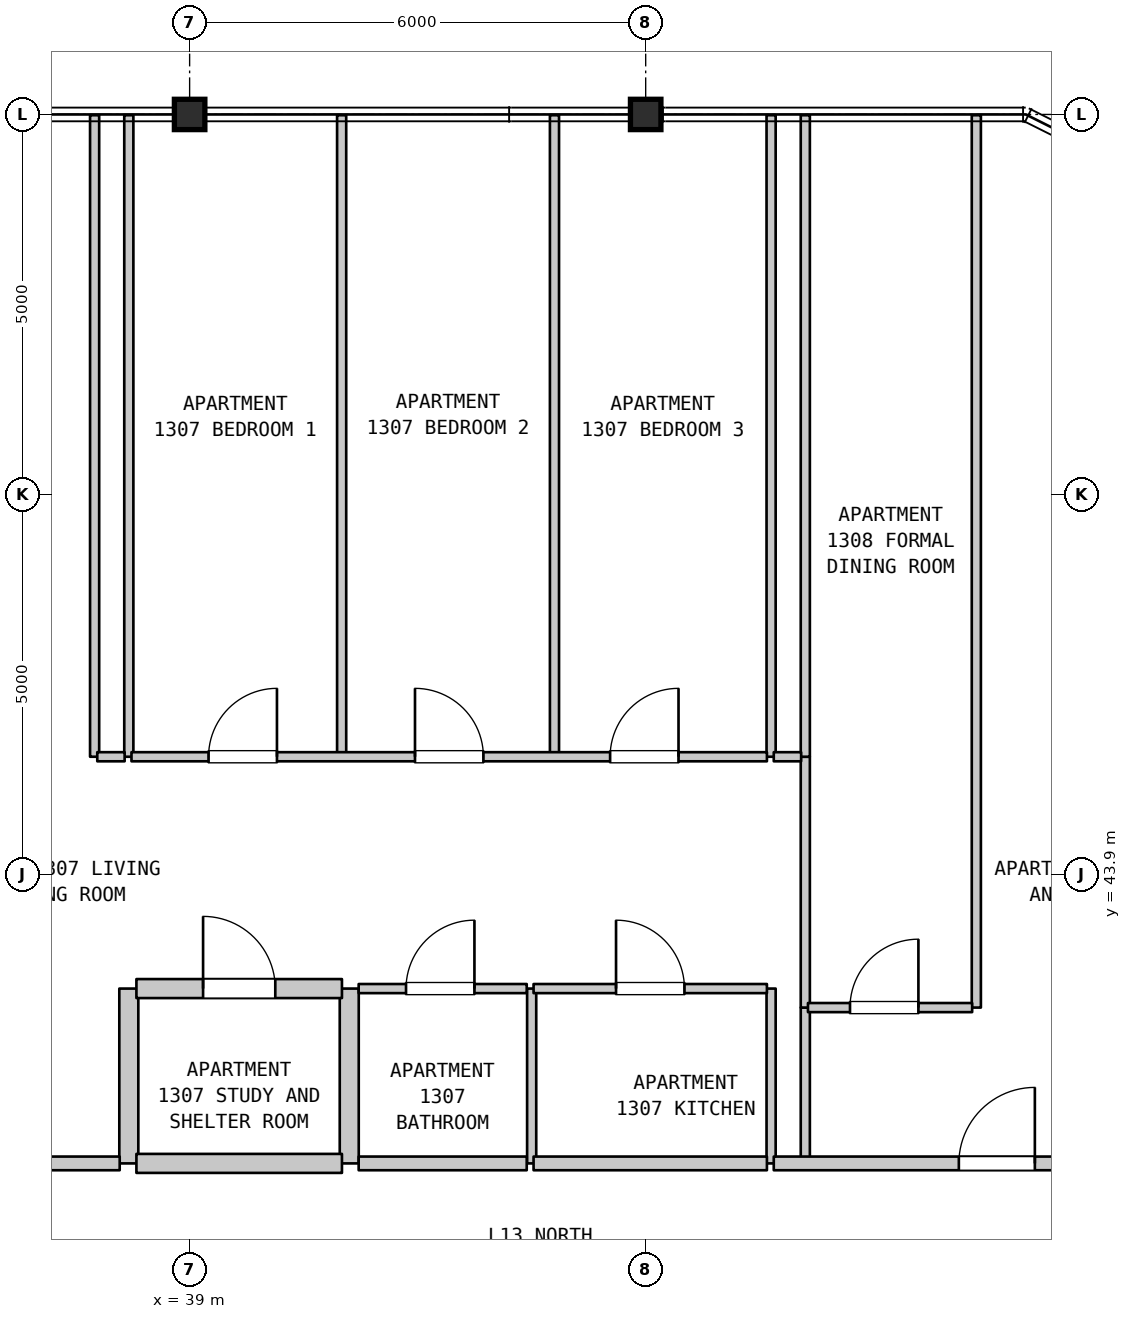
"""IFC4 building model, lengths in metres.
Left out: names, types, materials, properties, quantities, classifications, styles, units other than length and angle.
Written with IfcOpenShell. Run it as: python <this file> out.ifc"""

import sys

from ifc_helpers import new_model, si_unit, direction, frame, frame_2d, origin, origin_2d, place, context, subcontext, project, spatial, rectangle, i_section, extrude, element, fill, save


model = new_model("IFC4")
c1 = context("Model", 3, precision=1e-05, world=origin(), true_north=direction((0.0, 1.0)))
c2 = subcontext(c1, "Body", "Model", "MODEL_VIEW")
j1 = project(units=[si_unit("LENGTHUNIT", "METRE"), si_unit("PLANEANGLEUNIT", "RADIAN")], contexts=[c1])
p1 = place(None, origin())
s1 = spatial("IfcSite", under=j1, at=p1, CompositionType="ELEMENT")
p2 = place(p1, origin())
s2 = spatial("IfcBuilding", under=s1, at=p2, CompositionType="ELEMENT")
p3 = place(p2, frame((0.0, 0.0, 57.3)))
s3 = spatial("IfcBuildingStorey", under=s2, at=p3, CompositionType="ELEMENT", Elevation=57.3)
for number, where, z_axis, x_axis in (
    (1, (39.0, 53.9, 0.0), (0.0, 0.0, 1.0), (1.0, 0.0, 0.0)),
    (2, (45.0, 53.9, 0.0), (0.0, 0.0, 1.0), (1.0, 0.0, 0.0)),
):
    element("IfcColumn", number, at=place(p3, frame(where, z_axis=z_axis, x_axis=x_axis)), inside=s3, PredefinedType="COLUMN", context=c2, shape_type="SweptSolid", body=[
        extrude(i_section(OverallWidth=0.401, OverallDepth=0.399, WebThickness=0.025, FlangeThickness=0.04, FilletRadius=0.015, at=origin_2d()), origin(), (0.0, 0.0, 1.0), 3.7),
    ])
p4 = place(p3, frame((37.75, 45.45, 0.0), z_axis=(0.0, 0.0, 1.0), x_axis=(0.0, 1.0, 0.0)))
e3 = element("IfcWall", 3, at=p4, inside=s3, PredefinedType="PARTITIONING", context=c2, shape_type="SweptSolid", body=[
    extrude(rectangle(XDim=8.44, YDim=0.12, at=frame_2d((4.22, 0.0))), origin(), (0.0, 0.0, 1.0), 3.28),
])
p5 = place(p3, frame((38.2, 40.1, 0.0), z_axis=(0.0, 0.0, 1.0), x_axis=(0.0, 1.0, 0.0)))
e4 = element("IfcWall", 4, at=p5, inside=s3, PredefinedType="STANDARD", context=c2, shape_type="SweptSolid", body=[
    extrude(rectangle(XDim=2.3, YDim=0.25, at=frame_2d((1.15, 0.0))), origin(), (0.0, 0.0, 1.0), 3.28),
])
for number, where, z_axis, x_axis in (
    (5, (38.2, 45.45, 0.0), (0.0, 0.0, 1.0), (0.0, 1.0, 0.0)),
    (6, (41.0, 45.45, 0.0), (0.0, 0.0, 1.0), (0.0, 1.0, 0.0)),
):
    element("IfcWall", number, at=place(p3, frame(where, z_axis=z_axis, x_axis=x_axis)), inside=s3, PredefinedType="PARTITIONING", context=c2, shape_type="SweptSolid", body=[
        extrude(rectangle(XDim=8.44, YDim=0.12, at=frame_2d((4.22, 0.0))), origin(), (0.0, 0.0, 1.0), 3.28),
    ])
p6 = place(p3, frame((41.1, 40.1, 0.0), z_axis=(0.0, 0.0, 1.0), x_axis=(0.0, 1.0, 0.0)))
e7 = element("IfcWall", 7, at=p6, inside=s3, PredefinedType="STANDARD", context=c2, shape_type="SweptSolid", body=[
    extrude(rectangle(XDim=2.3, YDim=0.25, at=frame_2d((1.15, 0.0))), origin(), (0.0, 0.0, 1.0), 3.28),
])
p7 = place(p3, frame((43.5, 40.1, 0.0), z_axis=(0.0, 0.0, 1.0), x_axis=(0.0, 1.0, 0.0)))
e8 = element("IfcWall", 8, at=p7, inside=s3, PredefinedType="PARTITIONING", context=c2, shape_type="SweptSolid", body=[
    extrude(rectangle(XDim=2.3, YDim=0.12, at=frame_2d((1.15, 0.0))), origin(), (0.0, 0.0, 1.0), 3.28),
])
p8 = place(p3, frame((43.8, 45.45, 0.0), z_axis=(0.0, 0.0, 1.0), x_axis=(0.0, 1.0, 0.0)))
e9 = element("IfcWall", 9, at=p8, inside=s3, PredefinedType="PARTITIONING", context=c2, shape_type="SweptSolid", body=[
    extrude(rectangle(XDim=8.44, YDim=0.12, at=frame_2d((4.22, 0.0))), origin(), (0.0, 0.0, 1.0), 3.28),
])
p9 = place(p3, frame((46.65, 40.1, 0.0), z_axis=(0.0, 0.0, 1.0), x_axis=(0.0, 1.0, 0.0)))
e10 = element("IfcWall", 10, at=p9, inside=s3, PredefinedType="PARTITIONING", context=c2, shape_type="SweptSolid", body=[
    extrude(rectangle(XDim=2.3, YDim=0.12, at=frame_2d((1.15, 0.0))), origin(), (0.0, 0.0, 1.0), 3.28),
])
p10 = place(p3, frame((46.65, 45.45, 0.0), z_axis=(0.0, 0.0, 1.0), x_axis=(0.0, 1.0, 0.0)))
e11 = element("IfcWall", 11, at=p10, inside=s3, PredefinedType="PARTITIONING", context=c2, shape_type="SweptSolid", body=[
    extrude(rectangle(XDim=8.44, YDim=0.12, at=frame_2d((4.22, 0.0))), origin(), (0.0, 0.0, 1.0), 3.28),
])
p11 = place(p3, frame((47.1, 40.1, 0.0), z_axis=(0.0, 0.0, 1.0), x_axis=(0.0, 1.0, 0.0)))
e12 = element("IfcWall", 12, at=p11, inside=s3, PredefinedType="PARTITIONING", context=c2, shape_type="SweptSolid", body=[
    extrude(rectangle(XDim=2.05, YDim=0.12, at=frame_2d((1.025, 0.0))), origin(), (0.0, 0.0, 1.0), 3.28),
])
p12 = place(p3, frame((47.1, 42.15, 0.0), z_axis=(0.0, 0.0, 1.0), x_axis=(0.0, 1.0, 0.0)))
e13 = element("IfcWall", 13, at=p12, inside=s3, PredefinedType="PARTITIONING", context=c2, shape_type="SweptSolid", body=[
    extrude(rectangle(XDim=3.3, YDim=0.12, at=frame_2d((1.65, 0.0))), origin(), (0.0, 0.0, 1.0), 3.28),
])
p13 = place(p3, frame((47.1, 45.45, 0.0), z_axis=(0.0, 0.0, 1.0), x_axis=(0.0, 1.0, 0.0)))
e14 = element("IfcWall", 14, at=p13, inside=s3, PredefinedType="PARTITIONING", context=c2, shape_type="SweptSolid", body=[
    extrude(rectangle(XDim=8.44, YDim=0.12, at=frame_2d((4.22, 0.0))), origin(), (0.0, 0.0, 1.0), 3.28),
])
p14 = place(p3, frame((49.35, 42.15, 0.0), z_axis=(0.0, 0.0, 1.0), x_axis=(0.0, 1.0, 0.0)))
e15 = element("IfcWall", 15, at=p14, inside=s3, PredefinedType="PARTITIONING", context=c2, shape_type="SweptSolid", body=[
    extrude(rectangle(XDim=11.74, YDim=0.12, at=frame_2d((5.87, 0.0))), origin(), (0.0, 0.0, 1.0), 3.28),
])
p15 = place(p3, frame((32.535, 40.1, 0.0), z_axis=(0.0, 0.0, 1.0), x_axis=(1.0, 0.0, 0.0)))
e16 = element("IfcWall", 16, at=p15, inside=s3, PredefinedType="STANDARD", context=c2, shape_type="SweptSolid", body=[
    extrude(rectangle(XDim=5.545, YDim=0.18, at=frame_2d((2.772, 0.0))), origin(), (0.0, 0.0, 1.0), 3.28),
])
p16 = place(p15, frame((2.435, 0.0, 0.0)))
e17 = element("IfcOpeningElement", 17, at=p16, cuts=e16, PredefinedType="OPENING", context=c2, shape_type="SweptSolid", body=[
    extrude(rectangle(XDim=1.0, YDim=2.15, at=frame_2d((0.5, 1.075))), frame((0.0, 0.1, 0.0), z_axis=(0.0, -1.0, 0.0), x_axis=(1.0, 0.0, 0.0)), (0.0, 0.0, 1.0), 0.2),
])
p17 = place(p3, frame((38.3, 40.1, 0.0), z_axis=(0.0, 0.0, 1.0), x_axis=(1.0, 0.0, 0.0)))
e18 = element("IfcWall", 18, at=p17, inside=s3, PredefinedType="STANDARD", context=c2, shape_type="SweptSolid", body=[
    extrude(rectangle(XDim=2.704, YDim=0.25, at=frame_2d((1.352, 0.0))), origin(), (0.0, 0.0, 1.0), 3.28),
])
p18 = place(p3, frame((41.224, 40.1, 0.0), z_axis=(0.0, 0.0, 1.0), x_axis=(1.0, 0.0, 0.0)))
e19 = element("IfcWall", 19, at=p18, inside=s3, PredefinedType="STANDARD", context=c2, shape_type="SweptSolid", body=[
    extrude(rectangle(XDim=2.211, YDim=0.18, at=frame_2d((1.105, 0.0))), origin(), (0.0, 0.0, 1.0), 3.28),
])
p19 = place(p3, frame((43.525, 40.1, 0.0), z_axis=(0.0, 0.0, 1.0), x_axis=(1.0, 0.0, 0.0)))
e20 = element("IfcWall", 20, at=p19, inside=s3, PredefinedType="STANDARD", context=c2, shape_type="SweptSolid", body=[
    extrude(rectangle(XDim=3.07, YDim=0.18, at=frame_2d((1.535, 0.0))), origin(), (0.0, 0.0, 1.0), 3.28),
])
p20 = place(p3, frame((46.685, 40.1, 0.0), z_axis=(0.0, 0.0, 1.0), x_axis=(1.0, 0.0, 0.0)))
e21 = element("IfcWall", 21, at=p20, inside=s3, PredefinedType="STANDARD", context=c2, shape_type="SweptSolid", body=[
    extrude(rectangle(XDim=5.61, YDim=0.18, at=frame_2d((2.805, 0.0))), origin(), (0.0, 0.0, 1.0), 3.28),
])
p21 = place(p20, frame((2.435, 0.0, 0.0)))
e22 = element("IfcOpeningElement", 22, at=p21, cuts=e21, PredefinedType="OPENING", context=c2, shape_type="SweptSolid", body=[
    extrude(rectangle(XDim=1.0, YDim=2.15, at=frame_2d((0.5, 1.075))), frame((0.0, 0.1, 0.0), z_axis=(0.0, -1.0, 0.0), x_axis=(1.0, 0.0, 0.0)), (0.0, 0.0, 1.0), 0.2),
])
p22 = place(p3, frame((47.135, 42.15, 0.0), z_axis=(0.0, 0.0, 1.0), x_axis=(1.0, 0.0, 0.0)))
e23 = element("IfcWall", 23, at=p22, inside=s3, PredefinedType="PARTITIONING", context=c2, shape_type="SweptSolid", body=[
    extrude(rectangle(XDim=2.16, YDim=0.12, at=frame_2d((1.08, 0.0))), origin(), (0.0, 0.0, 1.0), 3.28),
])
p23 = place(p22, frame((0.553, 0.0, 0.0)))
e24 = element("IfcOpeningElement", 24, at=p23, cuts=e23, PredefinedType="OPENING", context=c2, shape_type="SweptSolid", body=[
    extrude(rectangle(XDim=0.9, YDim=2.15, at=frame_2d((0.45, 1.075))), frame((0.0, 0.07, 0.0), z_axis=(0.0, -1.0, 0.0), x_axis=(1.0, 0.0, 0.0)), (0.0, 0.0, 1.0), 0.14),
])
p24 = place(p3, frame((38.3, 42.4, 0.0), z_axis=(0.0, 0.0, 1.0), x_axis=(1.0, 0.0, 0.0)))
e25 = element("IfcWall", 25, at=p24, inside=s3, PredefinedType="STANDARD", context=c2, shape_type="SweptSolid", body=[
    extrude(rectangle(XDim=2.704, YDim=0.25, at=frame_2d((1.352, 0.0))), origin(), (0.0, 0.0, 1.0), 3.28),
])
p25 = place(p24, frame((0.877, 0.0, 0.0)))
e26 = element("IfcOpeningElement", 26, at=p25, cuts=e25, PredefinedType="OPENING", context=c2, shape_type="SweptSolid", body=[
    extrude(rectangle(XDim=0.95, YDim=2.15, at=frame_2d((0.475, 1.075))), frame((0.0, 0.135, 0.0), z_axis=(0.0, -1.0, 0.0), x_axis=(1.0, 0.0, 0.0)), (0.0, 0.0, 1.0), 0.27),
])
p26 = place(p3, frame((41.224, 42.4, 0.0), z_axis=(0.0, 0.0, 1.0), x_axis=(1.0, 0.0, 0.0)))
e27 = element("IfcWall", 27, at=p26, inside=s3, PredefinedType="PARTITIONING", context=c2, shape_type="SweptSolid", body=[
    extrude(rectangle(XDim=2.211, YDim=0.12, at=frame_2d((1.105, 0.0))), origin(), (0.0, 0.0, 1.0), 3.28),
])
p27 = place(p26, frame((0.623, 0.0, 0.0)))
e28 = element("IfcOpeningElement", 28, at=p27, cuts=e27, PredefinedType="OPENING", context=c2, shape_type="SweptSolid", body=[
    extrude(rectangle(XDim=0.9, YDim=2.1, at=frame_2d((0.45, 1.05))), frame((0.0, 0.07, 0.0), z_axis=(0.0, -1.0, 0.0), x_axis=(1.0, 0.0, 0.0)), (0.0, 0.0, 1.0), 0.14),
])
p28 = place(p3, frame((43.525, 42.4, 0.0), z_axis=(0.0, 0.0, 1.0), x_axis=(1.0, 0.0, 0.0)))
e29 = element("IfcWall", 29, at=p28, inside=s3, PredefinedType="PARTITIONING", context=c2, shape_type="SweptSolid", body=[
    extrude(rectangle(XDim=3.07, YDim=0.12, at=frame_2d((1.535, 0.0))), origin(), (0.0, 0.0, 1.0), 3.28),
])
p29 = place(p28, frame((1.085, 0.0, 0.0)))
e30 = element("IfcOpeningElement", 30, at=p29, cuts=e29, PredefinedType="OPENING", context=c2, shape_type="SweptSolid", body=[
    extrude(rectangle(XDim=0.9, YDim=2.15, at=frame_2d((0.45, 1.075))), frame((0.0, 0.07, 0.0), z_axis=(0.0, -1.0, 0.0), x_axis=(1.0, 0.0, 0.0)), (0.0, 0.0, 1.0), 0.14),
])
p30 = place(p3, frame((37.785, 45.45, 0.0), z_axis=(0.0, 0.0, 1.0), x_axis=(1.0, 0.0, 0.0)))
e31 = element("IfcWall", 31, at=p30, inside=s3, PredefinedType="PARTITIONING", context=c2, shape_type="SweptSolid", body=[
    extrude(rectangle(XDim=0.36, YDim=0.12, at=frame_2d((0.18, 0.0))), origin(), (0.0, 0.0, 1.0), 3.28),
])
p31 = place(p3, frame((38.235, 45.45, 0.0), z_axis=(0.0, 0.0, 1.0), x_axis=(1.0, 0.0, 0.0)))
e32 = element("IfcWall", 32, at=p31, inside=s3, PredefinedType="PARTITIONING", context=c2, shape_type="SweptSolid", body=[
    extrude(rectangle(XDim=8.36, YDim=0.12, at=frame_2d((4.18, 0.0))), origin(), (0.0, 0.0, 1.0), 3.28),
])
p32 = place(p31, frame((1.014, 0.0, 0.0)))
e33 = element("IfcOpeningElement", 33, at=p32, cuts=e32, PredefinedType="OPENING", context=c2, shape_type="SweptSolid", body=[
    extrude(rectangle(XDim=0.9, YDim=2.15, at=frame_2d((0.45, 1.075))), frame((0.0, 0.07, 0.0), z_axis=(0.0, -1.0, 0.0), x_axis=(1.0, 0.0, 0.0)), (0.0, 0.0, 1.0), 0.14),
])
p33 = place(p31, frame((3.73, 0.0, 0.0)))
e34 = element("IfcOpeningElement", 34, at=p33, cuts=e32, PredefinedType="OPENING", context=c2, shape_type="SweptSolid", body=[
    extrude(rectangle(XDim=0.9, YDim=2.15, at=frame_2d((0.45, 1.075))), frame((0.0, 0.07, 0.0), z_axis=(0.0, -1.0, 0.0), x_axis=(1.0, 0.0, 0.0)), (0.0, 0.0, 1.0), 0.14),
])
p34 = place(p31, frame((6.297, 0.0, 0.0)))
e35 = element("IfcOpeningElement", 35, at=p34, cuts=e32, PredefinedType="OPENING", context=c2, shape_type="SweptSolid", body=[
    extrude(rectangle(XDim=0.9, YDim=2.15, at=frame_2d((0.45, 1.075))), frame((0.0, 0.07, 0.0), z_axis=(0.0, -1.0, 0.0), x_axis=(1.0, 0.0, 0.0)), (0.0, 0.0, 1.0), 0.14),
])
p35 = place(p3, frame((46.685, 45.45, 0.0), z_axis=(0.0, 0.0, 1.0), x_axis=(1.0, 0.0, 0.0)))
e36 = element("IfcWall", 36, at=p35, inside=s3, PredefinedType="PARTITIONING", context=c2, shape_type="SweptSolid", body=[
    extrude(rectangle(XDim=0.36, YDim=0.12, at=frame_2d((0.18, 0.0))), origin(), (0.0, 0.0, 1.0), 3.28),
])
p36 = place(p21, origin())
e37 = element("IfcDoor", 37, at=p36, inside=s3, OperationType="SINGLE_SWING_RIGHT", PredefinedType="DOOR", context=c2, shape_type="SweptSolid", body=[
    extrude(rectangle(XDim=1.0, YDim=2.15, at=frame_2d((0.5, 1.075))), frame((0.0, 0.025, 0.0), z_axis=(0.0, -1.0, 0.0), x_axis=(1.0, 0.0, 0.0)), (0.0, 0.0, 1.0), 0.05),
])
fill(e22, e37)
p37 = place(p23, origin())
e38 = element("IfcDoor", 38, at=p37, inside=s3, OperationType="SINGLE_SWING_RIGHT", PredefinedType="DOOR", context=c2, shape_type="SweptSolid", body=[
    extrude(rectangle(XDim=0.9, YDim=2.15, at=frame_2d((0.45, 1.075))), frame((0.0, 0.025, 0.0), z_axis=(0.0, -1.0, 0.0), x_axis=(1.0, 0.0, 0.0)), (0.0, 0.0, 1.0), 0.05),
])
fill(e24, e38)
p38 = place(p25, origin())
e39 = element("IfcDoor", 39, at=p38, inside=s3, OperationType="SINGLE_SWING_LEFT", PredefinedType="DOOR", context=c2, shape_type="SweptSolid", body=[
    extrude(rectangle(XDim=0.95, YDim=2.15, at=frame_2d((0.475, 1.075))), frame((0.0, 0.025, 0.0), z_axis=(0.0, -1.0, 0.0), x_axis=(1.0, 0.0, 0.0)), (0.0, 0.0, 1.0), 0.05),
])
fill(e26, e39)
p39 = place(p27, origin())
e40 = element("IfcDoor", 40, at=p39, inside=s3, OperationType="SINGLE_SWING_RIGHT", PredefinedType="DOOR", context=c2, shape_type="SweptSolid", body=[
    extrude(rectangle(XDim=0.9, YDim=2.1, at=frame_2d((0.45, 1.05))), frame((0.0, 0.025, 0.0), z_axis=(0.0, -1.0, 0.0), x_axis=(1.0, 0.0, 0.0)), (0.0, 0.0, 1.0), 0.05),
])
fill(e28, e40)
p40 = place(p29, origin())
e41 = element("IfcDoor", 41, at=p40, inside=s3, OperationType="SINGLE_SWING_LEFT", PredefinedType="DOOR", context=c2, shape_type="SweptSolid", body=[
    extrude(rectangle(XDim=0.9, YDim=2.15, at=frame_2d((0.45, 1.075))), frame((0.0, 0.025, 0.0), z_axis=(0.0, -1.0, 0.0), x_axis=(1.0, 0.0, 0.0)), (0.0, 0.0, 1.0), 0.05),
])
fill(e30, e41)
p41 = place(p32, origin())
e42 = element("IfcDoor", 42, at=p41, inside=s3, OperationType="SINGLE_SWING_RIGHT", PredefinedType="DOOR", context=c2, shape_type="SweptSolid", body=[
    extrude(rectangle(XDim=0.9, YDim=2.15, at=frame_2d((0.45, 1.075))), frame((0.0, 0.025, 0.0), z_axis=(0.0, -1.0, 0.0), x_axis=(1.0, 0.0, 0.0)), (0.0, 0.0, 1.0), 0.05),
])
fill(e33, e42)
p42 = place(p33, origin())
e43 = element("IfcDoor", 43, at=p42, inside=s3, OperationType="SINGLE_SWING_LEFT", PredefinedType="DOOR", context=c2, shape_type="SweptSolid", body=[
    extrude(rectangle(XDim=0.9, YDim=2.15, at=frame_2d((0.45, 1.075))), frame((0.0, 0.025, 0.0), z_axis=(0.0, -1.0, 0.0), x_axis=(1.0, 0.0, 0.0)), (0.0, 0.0, 1.0), 0.05),
])
fill(e34, e43)
p43 = place(p34, origin())
e44 = element("IfcDoor", 44, at=p43, inside=s3, OperationType="SINGLE_SWING_RIGHT", PredefinedType="DOOR", context=c2, shape_type="SweptSolid", body=[
    extrude(rectangle(XDim=0.9, YDim=2.15, at=frame_2d((0.45, 1.075))), frame((0.0, 0.025, 0.0), z_axis=(0.0, -1.0, 0.0), x_axis=(1.0, 0.0, 0.0)), (0.0, 0.0, 1.0), 0.05),
])
fill(e35, e44)
save(model, sys.argv[1])
